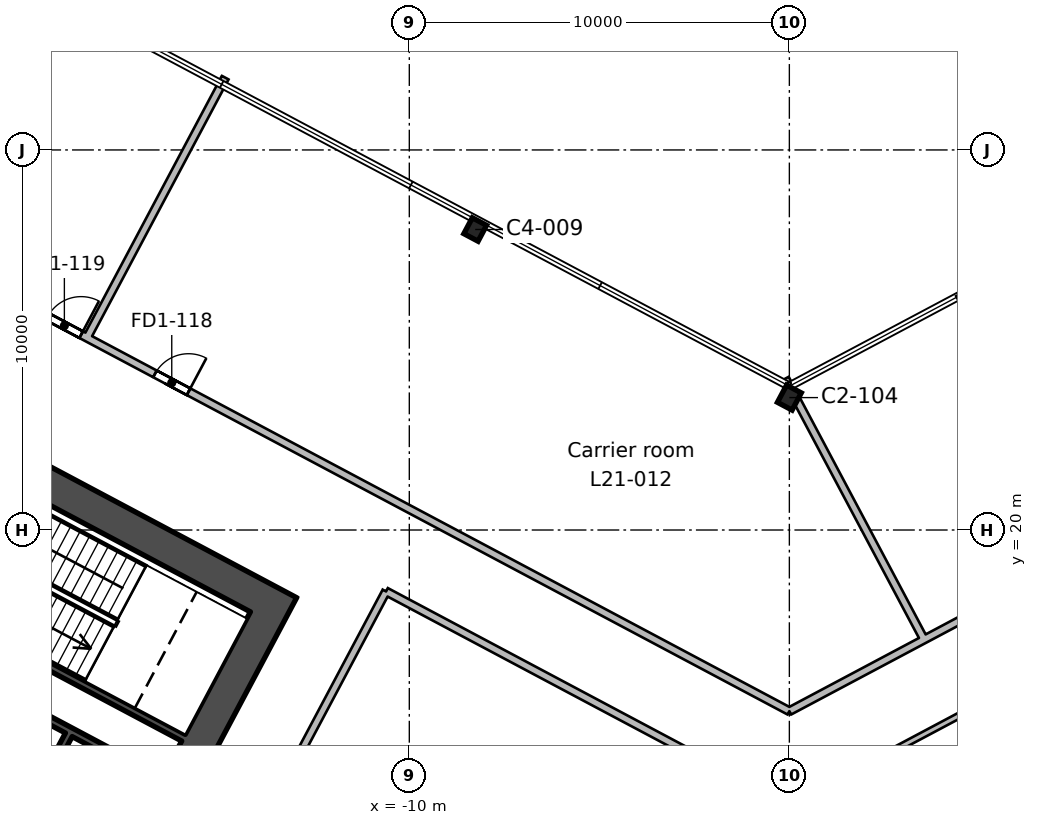
"""IFC4 building model, lengths in metres.
Left out: names, types, materials, properties, quantities, classifications, styles, units other than length and angle.
Written with IfcOpenShell. Run it as: python <this file> out.ifc"""

import sys

from ifc_helpers import new_model, si_unit, direction, frame, frame_2d, origin, origin_2d, place, context, subcontext, project, spatial, rectangle, i_section, extrude, element, fill, save


model = new_model("IFC4")
c1 = context("Model", 3, precision=1e-05, world=origin(), true_north=direction((0.0, 1.0)))
c2 = subcontext(c1, "Body", "Model", "MODEL_VIEW")
j1 = project(units=[si_unit("LENGTHUNIT", "METRE"), si_unit("PLANEANGLEUNIT", "RADIAN")], contexts=[c1])
p1 = place(None, origin())
s1 = spatial("IfcSite", under=j1, at=p1, CompositionType="ELEMENT")
p2 = place(p1, origin())
s2 = spatial("IfcBuilding", under=s1, at=p2, CompositionType="ELEMENT")
p3 = place(p2, frame((0.0, 0.0, 107.6)))
s3 = spatial("IfcBuildingStorey", under=s2, at=p3, CompositionType="ELEMENT", Elevation=107.6)
p4 = place(p3, frame((0.0, 23.484, 0.0), z_axis=(0.0, 0.0, 1.0), x_axis=(-0.882947592859, 0.469471562786, 0.0)))
e1 = element("IfcColumn", 1, at=p4, inside=s3, PredefinedType="COLUMN", context=c2, shape_type="SweptSolid", body=[
    extrude(i_section(OverallWidth=0.437, OverallDepth=0.513, WebThickness=0.061, FlangeThickness=0.097, FilletRadius=0.015, at=origin_2d()), origin(), (0.0, 0.0, 1.0), 4.6),
])
for number, where, z_axis, x_axis in (
    (2, (4.734, 26.029, 0.0), (0.0, 0.0, 1.0), (-0.883, -0.469, 0.0)),
    (3, (-8.266, 27.907, 0.0), (0.0, 0.0, 1.0), (-0.883, 0.469, 0.0)),
):
    element("IfcColumn", number, at=place(p3, frame(where, z_axis=z_axis, x_axis=x_axis)), inside=s3, PredefinedType="COLUMN", context=c2, shape_type="SweptSolid", body=[
        extrude(i_section(OverallWidth=0.424, OverallDepth=0.475, WebThickness=0.048, FlangeThickness=0.077, FilletRadius=0.015, at=origin_2d()), origin(), (0.0, 0.0, 1.0), 4.6),
    ])
p5 = place(p3, frame((-13.362, 18.43, 0.0), z_axis=(0.0, 0.0, 1.0), x_axis=(-0.46947084998, -0.882947971864, 0.0)))
e4 = element("IfcWall", 4, at=p5, inside=s3, PredefinedType="SHEAR", context=c2, shape_type="SweptSolid", body=[
    extrude(rectangle(XDim=20.0, YDim=0.9, at=frame_2d((10.0, 0.0))), origin(), (0.0, 0.0, 1.0), 4.6),
])
p6 = place(p5, frame((7.0, 0.0, 0.0)))
e5 = element("IfcOpeningElement", 5, at=p6, cuts=e4, PredefinedType="OPENING", context=c2, shape_type="SweptSolid", body=[
    extrude(rectangle(XDim=2.4, YDim=2.4, at=frame_2d((1.2, 1.2))), frame((0.0, 0.46, 0.0), z_axis=(0.0, -1.0, 0.0), x_axis=(1.0, 0.0, 0.0)), (0.0, 0.0, 1.0), 0.92),
])
p7 = place(p3, frame((-13.97, 18.244, 0.0), z_axis=(0.0, 0.0, 1.0), x_axis=(-0.88294509198, 0.469476266226, 0.0)))
e6 = element("IfcWall", 6, at=p7, inside=s3, PredefinedType="SHEAR", context=c2, shape_type="SweptSolid", body=[
    extrude(rectangle(XDim=20.2, YDim=0.9, at=frame_2d((10.1, 0.0))), origin(), (0.0, 0.0, 1.0), 4.6),
])
p8 = place(p3, frame((-18.96, 14.611, 0.0), z_axis=(0.0, 0.0, 1.0), x_axis=(-0.4694473164, -0.882960484464, 0.0)))
e7 = element("IfcWall", 7, at=p8, inside=s3, PredefinedType="SHEAR", context=c2, shape_type="SweptSolid", body=[
    extrude(rectangle(XDim=2.2, YDim=0.2, at=frame_2d((1.1, 0.0))), origin(), (0.0, 0.0, 1.0), 4.6),
])
p9 = place(p3, frame((-15.942, 14.536, 0.0), z_axis=(0.0, 0.0, 1.0), x_axis=(-0.882946947542, 0.469472776449, 0.0)))
e8 = element("IfcWall", 8, at=p9, inside=s3, PredefinedType="SHEAR", context=c2, shape_type="SweptSolid", body=[
    extrude(rectangle(XDim=8.0, YDim=0.2, at=frame_2d((4.0, 0.0))), origin(), (0.0, 0.0, 1.0), 4.6),
])
p10 = place(p3, frame((-16.529, 13.432, 0.0), z_axis=(0.0, 0.0, 1.0), x_axis=(-0.88295287151, 0.469461634952, 0.0)))
e9 = element("IfcWall", 9, at=p10, inside=s3, PredefinedType="SHEAR", context=c2, shape_type="SweptSolid", body=[
    extrude(rectangle(XDim=8.0, YDim=0.2, at=frame_2d((4.0, 0.0))), origin(), (0.0, 0.0, 1.0), 4.6),
])
p11 = place(p3, frame((-32.541, 32.535, 0.0), z_axis=(0.0, 0.0, 1.0), x_axis=(0.882951675281, -0.469463884787, 0.0)))
e10 = element("IfcWall", 10, at=p11, inside=s3, PredefinedType="PARTITIONING", context=c2, shape_type="SweptSolid", body=[
    extrude(rectangle(XDim=36.855, YDim=0.2, at=frame_2d((18.427, 0.0))), origin(), (0.0, 0.0, 1.0), 4.15),
])
p12 = place(p11, frame((17.95, 0.0, 0.0)))
e11 = element("IfcOpeningElement", 11, at=p12, cuts=e10, PredefinedType="OPENING", context=c2, shape_type="SweptSolid", body=[
    extrude(rectangle(XDim=1.0, YDim=2.1, at=frame_2d((0.5, 1.05))), frame((0.0, 0.11, 0.0), z_axis=(0.0, -1.0, 0.0), x_axis=(1.0, 0.0, 0.0)), (0.0, 0.0, 1.0), 0.22),
])
p13 = place(p11, frame((14.75, 0.0, 0.0)))
e12 = element("IfcOpeningElement", 12, at=p13, cuts=e10, PredefinedType="OPENING", context=c2, shape_type="SweptSolid", body=[
    extrude(rectangle(XDim=1.0, YDim=2.1, at=frame_2d((0.5, 1.05))), frame((0.0, 0.11, 0.0), z_axis=(0.0, -1.0, 0.0), x_axis=(1.0, 0.0, 0.0)), (0.0, 0.0, 1.0), 0.22),
])
p14 = place(p3, frame((0.0, 15.233, 0.0), z_axis=(0.0, 0.0, 1.0), x_axis=(0.882948052406, 0.469470698502, 0.0)))
e13 = element("IfcWall", 13, at=p14, inside=s3, PredefinedType="PARTITIONING", context=c2, shape_type="SweptSolid", body=[
    extrude(rectangle(XDim=36.115, YDim=0.2, at=frame_2d((18.058, 0.0))), origin(), (0.0, 0.0, 1.0), 4.15),
])
p15 = place(p14, frame((30.45, 0.0, 0.0)))
e14 = element("IfcOpeningElement", 14, at=p15, cuts=e13, PredefinedType="OPENING", context=c2, shape_type="SweptSolid", body=[
    extrude(rectangle(XDim=0.95, YDim=2.1, at=frame_2d((0.475, 1.05))), frame((0.0, 0.11, 0.0), z_axis=(0.0, -1.0, 0.0), x_axis=(1.0, 0.0, 0.0)), (0.0, 0.0, 1.0), 0.22),
])
p16 = place(p14, frame((19.95, 0.0, 0.0)))
e15 = element("IfcOpeningElement", 15, at=p16, cuts=e13, PredefinedType="OPENING", context=c2, shape_type="SweptSolid", body=[
    extrude(rectangle(XDim=1.0, YDim=2.1, at=frame_2d((0.5, 1.05))), frame((0.0, 0.11, 0.0), z_axis=(0.0, -1.0, 0.0), x_axis=(1.0, 0.0, 0.0)), (0.0, 0.0, 1.0), 0.22),
])
p17 = place(p14, frame((17.55, 0.0, 0.0)))
e16 = element("IfcOpeningElement", 16, at=p17, cuts=e13, PredefinedType="OPENING", context=c2, shape_type="SweptSolid", body=[
    extrude(rectangle(XDim=1.0, YDim=2.1, at=frame_2d((0.5, 1.05))), frame((0.0, 0.11, 0.0), z_axis=(0.0, -1.0, 0.0), x_axis=(1.0, 0.0, 0.0)), (0.0, 0.0, 1.0), 0.22),
])
p18 = place(p3, frame((-14.844, 31.903, 0.0), z_axis=(0.0, 0.0, 1.0), x_axis=(-0.469317225666, -0.883029638061, 0.0)))
e17 = element("IfcWall", 17, at=p18, inside=s3, PredefinedType="PARTITIONING", context=c2, shape_type="SweptSolid", body=[
    extrude(rectangle(XDim=7.75, YDim=0.2, at=frame_2d((3.875, 0.0))), origin(), (0.0, 0.0, 1.0), 4.15),
])
p19 = place(p3, frame((-0.105, 23.984, 0.0), z_axis=(0.0, 0.0, 1.0), x_axis=(0.469391658377, -0.882990074149, 0.0)))
e18 = element("IfcWall", 18, at=p19, inside=s3, PredefinedType="PARTITIONING", context=c2, shape_type="SweptSolid", body=[
    extrude(rectangle(XDim=7.776, YDim=0.2, at=frame_2d((3.888, 0.0))), origin(), (0.0, 0.0, 1.0), 4.15),
])
p20 = place(p3, frame((-21.175, -1.483, 0.0), z_axis=(0.0, 0.0, 1.0), x_axis=(0.469455871296, 0.882955935993, 0.0)))
e19 = element("IfcWall", 19, at=p20, inside=s3, PredefinedType="PARTITIONING", context=c2, shape_type="SweptSolid", body=[
    extrude(rectangle(XDim=22.5, YDim=0.2, at=frame_2d((11.25, 0.0))), origin(), (0.0, 0.0, 1.0), 4.15),
])
p21 = place(p20, frame((10.75, 0.0, 0.0)))
e20 = element("IfcOpeningElement", 20, at=p21, cuts=e19, PredefinedType="OPENING", context=c2, shape_type="SweptSolid", body=[
    extrude(rectangle(XDim=1.0, YDim=2.1, at=frame_2d((0.5, 1.05))), frame((0.0, 0.11, 0.0), z_axis=(0.0, -1.0, 0.0), x_axis=(1.0, 0.0, 0.0)), (0.0, 0.0, 1.0), 0.22),
])
p22 = place(p3, frame((-10.612, 18.384, 0.0), z_axis=(0.0, 0.0, 1.0), x_axis=(0.882943182981, -0.469479856467, 0.0)))
e21 = element("IfcWall", 21, at=p22, inside=s3, PredefinedType="PARTITIONING", context=c2, shape_type="SweptSolid", body=[
    extrude(rectangle(XDim=10.19, YDim=0.2, at=frame_2d((5.095, 0.0))), origin(), (0.0, 0.0, 1.0), 4.15),
])
p23 = place(p3, frame((7.08, 16.506, 0.0), z_axis=(0.0, 0.0, 1.0), x_axis=(-0.882936403153, -0.469492606957, 0.0)))
e22 = element("IfcWall", 22, at=p23, inside=s3, PredefinedType="PARTITIONING", context=c2, shape_type="SweptSolid", body=[
    extrude(rectangle(XDim=6.19, YDim=0.15, at=frame_2d((3.095, 0.0))), origin(), (0.0, 0.0, 1.0), 4.15),
])
p24 = place(p12, origin())
e23 = element("IfcDoor", 23, at=p24, inside=s3, OperationType="SINGLE_SWING_RIGHT", PredefinedType="DOOR", context=c2, shape_type="SweptSolid", body=[
    extrude(rectangle(XDim=1.0, YDim=2.1, at=frame_2d((0.5, 1.05))), frame((0.0, 0.025, 0.0), z_axis=(0.0, -1.0, 0.0), x_axis=(1.0, 0.0, 0.0)), (0.0, 0.0, 1.0), 0.05),
])
fill(e11, e23)
p25 = place(p13, origin())
e24 = element("IfcDoor", 24, at=p25, inside=s3, OperationType="SINGLE_SWING_RIGHT", PredefinedType="DOOR", context=c2, shape_type="SweptSolid", body=[
    extrude(rectangle(XDim=1.0, YDim=2.1, at=frame_2d((0.5, 1.05))), frame((0.0, 0.025, 0.0), z_axis=(0.0, -1.0, 0.0), x_axis=(1.0, 0.0, 0.0)), (0.0, 0.0, 1.0), 0.05),
])
fill(e12, e24)
save(model, sys.argv[1])
